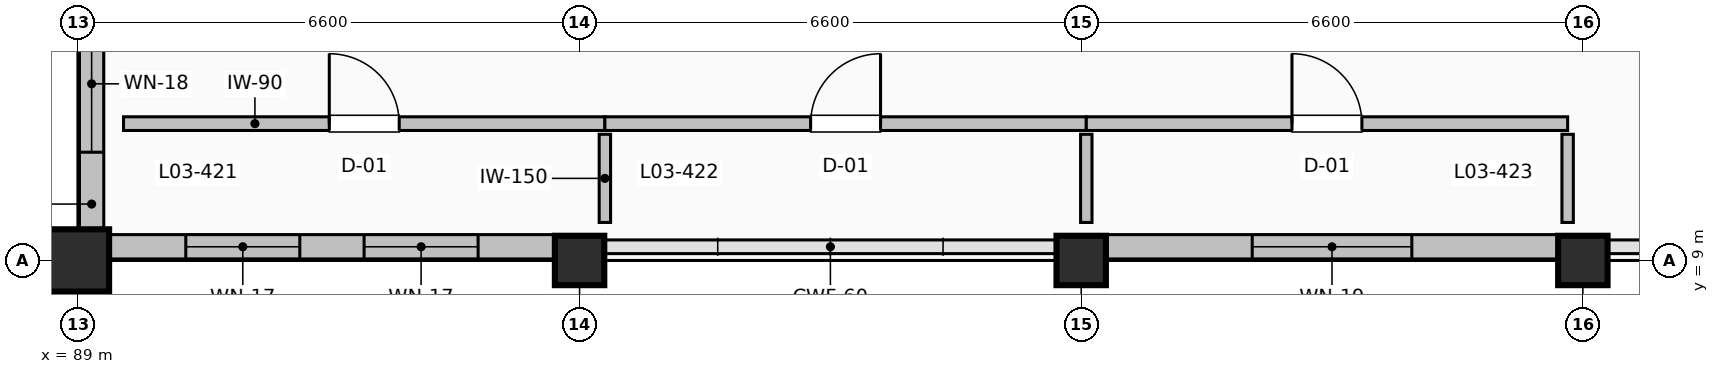
"""IFC4 building model, lengths in metres.
Left out: names, types, materials, properties, quantities, classifications, styles, units other than length and angle.
Written with IfcOpenShell. Run it as: python <this file> out.ifc"""

import sys

from ifc_helpers import new_model, si_unit, direction, frame, frame_2d, origin, origin_2d, place, context, subcontext, project, spatial, rectangle, extrude, element, fill, save


model = new_model("IFC4")
c1 = context("Model", 3, precision=1e-05, world=origin(), true_north=direction((0.0, 1.0)))
c2 = subcontext(c1, "Body", "Model", "MODEL_VIEW")
j1 = project(units=[si_unit("LENGTHUNIT", "METRE"), si_unit("PLANEANGLEUNIT", "RADIAN")], contexts=[c1])
p1 = place(None, origin())
s1 = spatial("IfcSite", under=j1, at=p1, CompositionType="ELEMENT")
p2 = place(p1, origin())
s2 = spatial("IfcBuilding", under=s1, at=p2, CompositionType="ELEMENT")
p3 = place(p2, frame((0.0, 0.0, 15.0)))
s3 = spatial("IfcBuildingStorey", under=s2, at=p3, CompositionType="ELEMENT", Elevation=15.0)
p4 = place(p3, frame((89.0, 9.0, 0.0), z_axis=(0.0, 0.0, 1.0), x_axis=(1.0, 0.0, 0.0)))
e1 = element("IfcColumn", 1, at=p4, inside=s3, PredefinedType="COLUMN", context=c2, shape_type="SweptSolid", body=[
    extrude(rectangle(XDim=0.82, YDim=0.82, at=origin_2d()), origin(), (0.0, 0.0, 1.0), 4.5),
])
for number, where, z_axis, x_axis in (
    (2, (95.6, 9.0, 0.0), (0.0, 0.0, 1.0), (1.0, 0.0, 0.0)),
    (3, (102.2, 9.0, 0.0), (0.0, 0.0, 1.0), (1.0, 0.0, 0.0)),
    (4, (108.8, 9.0, 0.0), (0.0, 0.0, 1.0), (1.0, 0.0, 0.0)),
):
    element("IfcColumn", number, at=place(p3, frame(where, z_axis=z_axis, x_axis=x_axis)), inside=s3, PredefinedType="COLUMN", context=c2, shape_type="SweptSolid", body=[
        extrude(rectangle(XDim=0.65, YDim=0.65, at=origin_2d()), origin(), (0.0, 0.0, 1.0), 4.5),
    ])
p5 = place(p3, frame((89.18, 9.41, 0.0), z_axis=(0.0, 0.0, 1.0), x_axis=(0.0, 1.0, 0.0)))
e5 = element("IfcWall", 5, at=p5, inside=s3, PredefinedType="SOLIDWALL", context=c2, shape_type="SweptSolid", body=[
    extrude(rectangle(XDim=6.38, YDim=0.32, at=frame_2d((3.19, 0.0))), origin(), (0.0, 0.0, 1.0), 3.522),
])
p6 = place(p5, frame((1.014, 0.0, 1.0)))
e6 = element("IfcOpeningElement", 6, at=p6, cuts=e5, PredefinedType="OPENING", context=c2, shape_type="SweptSolid", body=[
    extrude(rectangle(XDim=1.8, YDim=1.7, at=frame_2d((0.9, 0.85))), frame((0.0, 0.17, 0.0), z_axis=(0.0, -1.0, 0.0), x_axis=(1.0, 0.0, 0.0)), (0.0, 0.0, 1.0), 0.34),
])
p7 = place(p5, frame((3.566, 0.0, 1.0)))
e7 = element("IfcOpeningElement", 7, at=p7, cuts=e5, PredefinedType="OPENING", context=c2, shape_type="SweptSolid", body=[
    extrude(rectangle(XDim=1.8, YDim=1.7, at=frame_2d((0.9, 0.85))), frame((0.0, 0.17, 0.0), z_axis=(0.0, -1.0, 0.0), x_axis=(1.0, 0.0, 0.0)), (0.0, 0.0, 1.0), 0.34),
])
p8 = place(p3, frame((108.475, 9.18, 0.0), z_axis=(0.0, 0.0, 1.0), x_axis=(-1.0, 0.0, 0.0)))
e8 = element("IfcWall", 8, at=p8, inside=s3, PredefinedType="SOLIDWALL", context=c2, shape_type="SweptSolid", body=[
    extrude(rectangle(XDim=5.95, YDim=0.32, at=frame_2d((2.975, 0.0))), origin(), (0.0, 0.0, 1.0), 3.522),
])
p9 = place(p8, frame((1.925, 0.0, 1.0)))
e9 = element("IfcOpeningElement", 9, at=p9, cuts=e8, PredefinedType="OPENING", context=c2, shape_type="SweptSolid", body=[
    extrude(rectangle(XDim=2.1, YDim=1.7, at=frame_2d((1.05, 0.85))), frame((0.0, 0.17, 0.0), z_axis=(0.0, -1.0, 0.0), x_axis=(1.0, 0.0, 0.0)), (0.0, 0.0, 1.0), 0.34),
])
p10 = place(p3, frame((95.275, 9.18, 0.0), z_axis=(0.0, 0.0, 1.0), x_axis=(-1.0, 0.0, 0.0)))
e10 = element("IfcWall", 10, at=p10, inside=s3, PredefinedType="SOLIDWALL", context=c2, shape_type="SweptSolid", body=[
    extrude(rectangle(XDim=5.865, YDim=0.32, at=frame_2d((2.933, 0.0))), origin(), (0.0, 0.0, 1.0), 3.522),
])
p11 = place(p10, frame((1.01, 0.0, 1.0)))
e11 = element("IfcOpeningElement", 11, at=p11, cuts=e10, PredefinedType="OPENING", context=c2, shape_type="SweptSolid", body=[
    extrude(rectangle(XDim=1.5, YDim=1.7, at=frame_2d((0.75, 0.85))), frame((0.0, 0.17, 0.0), z_axis=(0.0, -1.0, 0.0), x_axis=(1.0, 0.0, 0.0)), (0.0, 0.0, 1.0), 0.34),
])
p12 = place(p10, frame((3.356, 0.0, 1.0)))
e12 = element("IfcOpeningElement", 12, at=p12, cuts=e10, PredefinedType="OPENING", context=c2, shape_type="SweptSolid", body=[
    extrude(rectangle(XDim=1.5, YDim=1.7, at=frame_2d((0.75, 0.85))), frame((0.0, 0.17, 0.0), z_axis=(0.0, -1.0, 0.0), x_axis=(1.0, 0.0, 0.0)), (0.0, 0.0, 1.0), 0.34),
])
p13 = place(p3, frame((89.6, 10.8, 0.0), z_axis=(0.0, 0.0, 1.0), x_axis=(1.0, 0.0, 0.0)))
e13 = element("IfcWall", 13, at=p13, inside=s3, PredefinedType="PARTITIONING", context=c2, shape_type="SweptSolid", body=[
    extrude(rectangle(XDim=6.333, YDim=0.18, at=frame_2d((3.167, 0.0))), origin(), (0.0, 0.0, 1.0), 4.192),
])
p14 = place(p13, frame((2.707, 0.0, 0.0)))
e14 = element("IfcOpeningElement", 14, at=p14, cuts=e13, PredefinedType="OPENING", context=c2, shape_type="SweptSolid", body=[
    extrude(rectangle(XDim=0.92, YDim=2.05, at=frame_2d((0.46, 1.025))), frame((0.0, 0.1, 0.0), z_axis=(0.0, -1.0, 0.0), x_axis=(1.0, 0.0, 0.0)), (0.0, 0.0, 1.0), 0.2),
])
p15 = place(p3, frame((95.933, 9.5, 0.0), z_axis=(0.0, 0.0, 1.0), x_axis=(0.0, 1.0, 0.0)))
e15 = element("IfcWall", 15, at=p15, inside=s3, PredefinedType="PARTITIONING", context=c2, shape_type="SweptSolid", body=[
    extrude(rectangle(XDim=1.16, YDim=0.15, at=frame_2d((0.58, 0.0))), origin(), (0.0, 0.0, 1.0), 4.192),
])
p16 = place(p3, frame((95.933, 10.8, 0.0), z_axis=(0.0, 0.0, 1.0), x_axis=(1.0, 0.0, 0.0)))
e16 = element("IfcWall", 16, at=p16, inside=s3, PredefinedType="PARTITIONING", context=c2, shape_type="SweptSolid", body=[
    extrude(rectangle(XDim=6.334, YDim=0.18, at=frame_2d((3.167, 0.0))), origin(), (0.0, 0.0, 1.0), 4.192),
])
p17 = place(p16, frame((2.707, 0.0, 0.0)))
e17 = element("IfcOpeningElement", 17, at=p17, cuts=e16, PredefinedType="OPENING", context=c2, shape_type="SweptSolid", body=[
    extrude(rectangle(XDim=0.92, YDim=2.05, at=frame_2d((0.46, 1.025))), frame((0.0, 0.1, 0.0), z_axis=(0.0, -1.0, 0.0), x_axis=(1.0, 0.0, 0.0)), (0.0, 0.0, 1.0), 0.2),
])
for number, where, z_axis, x_axis in (
    (18, (102.267, 9.5, 0.0), (0.0, 0.0, 1.0), (0.0, 1.0, 0.0)),
    (19, (108.6, 9.5, 0.0), (0.0, 0.0, 1.0), (0.0, 1.0, 0.0)),
):
    element("IfcWall", number, at=place(p3, frame(where, z_axis=z_axis, x_axis=x_axis)), inside=s3, PredefinedType="PARTITIONING", context=c2, shape_type="SweptSolid", body=[
        extrude(rectangle(XDim=1.16, YDim=0.15, at=frame_2d((0.58, 0.0))), origin(), (0.0, 0.0, 1.0), 3.522),
    ])
p18 = place(p3, frame((102.267, 10.8, 0.0), z_axis=(0.0, 0.0, 1.0), x_axis=(1.0, 0.0, 0.0)))
e20 = element("IfcWall", 20, at=p18, inside=s3, PredefinedType="PARTITIONING", context=c2, shape_type="SweptSolid", body=[
    extrude(rectangle(XDim=6.333, YDim=0.18, at=frame_2d((3.167, 0.0))), origin(), (0.0, 0.0, 1.0), 4.192),
])
p19 = place(p18, frame((2.706, 0.0, 0.0)))
e21 = element("IfcOpeningElement", 21, at=p19, cuts=e20, PredefinedType="OPENING", context=c2, shape_type="SweptSolid", body=[
    extrude(rectangle(XDim=0.92, YDim=2.05, at=frame_2d((0.46, 1.025))), frame((0.0, 0.1, 0.0), z_axis=(0.0, -1.0, 0.0), x_axis=(1.0, 0.0, 0.0)), (0.0, 0.0, 1.0), 0.2),
])
p20 = place(p6, origin())
e22 = element("IfcWindow", 22, at=p20, inside=s3, PartitioningType="SINGLE_PANEL", PredefinedType="WINDOW", context=c2, shape_type="SweptSolid", body=[
    extrude(rectangle(XDim=1.8, YDim=1.7, at=frame_2d((0.9, 0.85))), frame((0.0, 0.03, 0.0), z_axis=(0.0, -1.0, 0.0), x_axis=(1.0, 0.0, 0.0)), (0.0, 0.0, 1.0), 0.06),
])
fill(e6, e22)
p21 = place(p9, origin())
e23 = element("IfcWindow", 23, at=p21, inside=s3, PartitioningType="SINGLE_PANEL", PredefinedType="WINDOW", context=c2, shape_type="SweptSolid", body=[
    extrude(rectangle(XDim=2.1, YDim=1.7, at=frame_2d((1.05, 0.85))), frame((0.0, 0.03, 0.0), z_axis=(0.0, -1.0, 0.0), x_axis=(1.0, 0.0, 0.0)), (0.0, 0.0, 1.0), 0.06),
])
fill(e9, e23)
p22 = place(p11, origin())
e24 = element("IfcWindow", 24, at=p22, inside=s3, PartitioningType="SINGLE_PANEL", PredefinedType="WINDOW", context=c2, shape_type="SweptSolid", body=[
    extrude(rectangle(XDim=1.5, YDim=1.7, at=frame_2d((0.75, 0.85))), frame((0.0, 0.03, 0.0), z_axis=(0.0, -1.0, 0.0), x_axis=(1.0, 0.0, 0.0)), (0.0, 0.0, 1.0), 0.06),
])
fill(e11, e24)
p23 = place(p12, origin())
e25 = element("IfcWindow", 25, at=p23, inside=s3, PartitioningType="SINGLE_PANEL", PredefinedType="WINDOW", context=c2, shape_type="SweptSolid", body=[
    extrude(rectangle(XDim=1.5, YDim=1.7, at=frame_2d((0.75, 0.85))), frame((0.0, 0.03, 0.0), z_axis=(0.0, -1.0, 0.0), x_axis=(1.0, 0.0, 0.0)), (0.0, 0.0, 1.0), 0.06),
])
fill(e12, e25)
p24 = place(p14, origin())
e26 = element("IfcDoor", 26, at=p24, inside=s3, OperationType="SINGLE_SWING_LEFT", PredefinedType="DOOR", context=c2, shape_type="SweptSolid", body=[
    extrude(rectangle(XDim=0.92, YDim=2.05, at=frame_2d((0.46, 1.025))), frame((0.0, 0.025, 0.0), z_axis=(0.0, -1.0, 0.0), x_axis=(1.0, 0.0, 0.0)), (0.0, 0.0, 1.0), 0.05),
])
fill(e14, e26)
p25 = place(p17, origin())
e27 = element("IfcDoor", 27, at=p25, inside=s3, OperationType="SINGLE_SWING_RIGHT", PredefinedType="DOOR", context=c2, shape_type="SweptSolid", body=[
    extrude(rectangle(XDim=0.92, YDim=2.05, at=frame_2d((0.46, 1.025))), frame((0.0, 0.025, 0.0), z_axis=(0.0, -1.0, 0.0), x_axis=(1.0, 0.0, 0.0)), (0.0, 0.0, 1.0), 0.05),
])
fill(e17, e27)
p26 = place(p19, origin())
e28 = element("IfcDoor", 28, at=p26, inside=s3, OperationType="SINGLE_SWING_LEFT", PredefinedType="DOOR", context=c2, shape_type="SweptSolid", body=[
    extrude(rectangle(XDim=0.92, YDim=2.05, at=frame_2d((0.46, 1.025))), frame((0.0, 0.025, 0.0), z_axis=(0.0, -1.0, 0.0), x_axis=(1.0, 0.0, 0.0)), (0.0, 0.0, 1.0), 0.05),
])
fill(e21, e28)
save(model, sys.argv[1])
